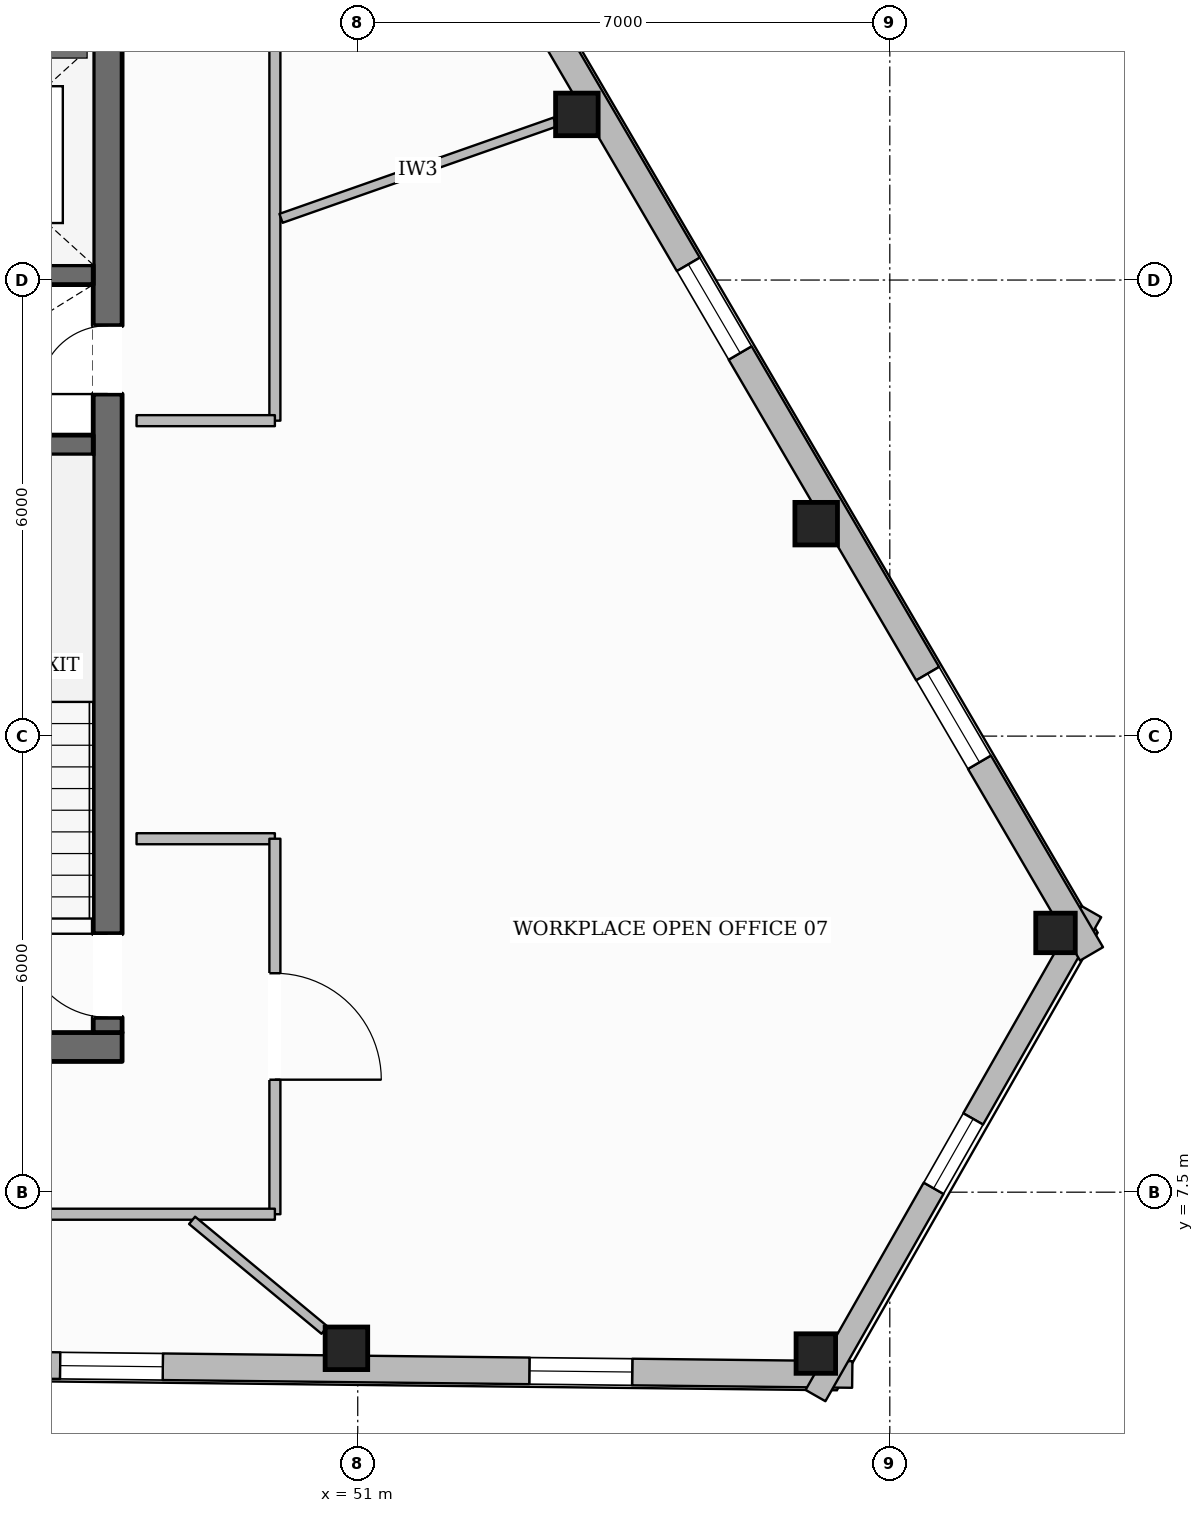
"""IFC4 building model, lengths in metres.
Left out: names, types, materials, properties, quantities, classifications, styles, units other than length and angle.
Written with IfcOpenShell. Run it as: python <this file> out.ifc"""

import sys

from ifc_helpers import new_model, si_unit, direction, frame, frame_2d, origin, origin_2d, place, context, subcontext, project, spatial, rectangle, hollow_rectangle, extrude, element, fill, save


model = new_model("IFC4")
c1 = context("Model", 3, precision=1e-05, world=origin(), true_north=direction((0.0, 1.0)))
c2 = subcontext(c1, "Body", "Model", "MODEL_VIEW")
j1 = project(units=[si_unit("LENGTHUNIT", "METRE"), si_unit("PLANEANGLEUNIT", "RADIAN")], contexts=[c1])
p1 = place(None, origin())
s1 = spatial("IfcSite", under=j1, at=p1, CompositionType="ELEMENT")
p2 = place(p1, origin())
s2 = spatial("IfcBuilding", under=s1, at=p2, CompositionType="ELEMENT")
p3 = place(p2, frame((0.0, 0.0, 254.9)))
s3 = spatial("IfcBuildingStorey", under=s2, at=p3, CompositionType="ELEMENT", Elevation=254.9)
p4 = place(p3, frame((28.1, 9.41, 0.0), z_axis=(0.0, 0.0, 1.0), x_axis=(1.0, 0.0, 0.0)))
e1 = element("IfcWall", 1, at=p4, inside=s3, PredefinedType="SOLIDWALL", context=c2, shape_type="SweptSolid", body=[
    extrude(rectangle(XDim=19.8, YDim=0.38, at=frame_2d((9.9, 0.0))), origin(), (0.0, 0.0, 1.0), 3.61),
])
p5 = place(p4, frame((10.4, 0.0, 0.0)))
e2 = element("IfcOpeningElement", 2, at=p5, cuts=e1, PredefinedType="OPENING", context=c2, shape_type="SweptSolid", body=[
    extrude(rectangle(XDim=1.4, YDim=2.2, at=frame_2d((0.7, 1.1))), frame((0.0, 0.2, 0.0), z_axis=(0.0, -1.0, 0.0), x_axis=(1.0, 0.0, 0.0)), (0.0, 0.0, 1.0), 0.4),
])
p6 = place(p3, frame((47.71, 9.6, 0.0), z_axis=(0.0, 0.0, 1.0), x_axis=(0.0, 1.0, 0.0)))
e3 = element("IfcWall", 3, at=p6, inside=s3, PredefinedType="SOLIDWALL", context=c2, shape_type="SweptSolid", body=[
    extrude(rectangle(XDim=13.0, YDim=0.38, at=frame_2d((6.5, 0.0))), origin(), (0.0, 0.0, 1.0), 3.61),
])
p7 = place(p6, frame((0.2, 0.0, 0.0)))
e4 = element("IfcOpeningElement", 4, at=p7, cuts=e3, PredefinedType="OPENING", context=c2, shape_type="SweptSolid", body=[
    extrude(rectangle(XDim=1.1, YDim=2.15, at=frame_2d((0.55, 1.075))), frame((0.0, 0.2, 0.0), z_axis=(0.0, -1.0, 0.0), x_axis=(1.0, 0.0, 0.0)), (0.0, 0.0, 1.0), 0.4),
])
p8 = place(p6, frame((8.4, 0.0, 0.0)))
e5 = element("IfcOpeningElement", 5, at=p8, cuts=e3, PredefinedType="OPENING", context=c2, shape_type="SweptSolid", body=[
    extrude(rectangle(XDim=0.9, YDim=2.1, at=frame_2d((0.45, 1.05))), frame((0.0, 0.2, 0.0), z_axis=(0.0, -1.0, 0.0), x_axis=(1.0, 0.0, 0.0)), (0.0, 0.0, 1.0), 0.4),
])
for number, where, z_axis, x_axis in (
    (6, (44.32, 17.33, 0.0), (0.0, 0.0, 1.0), (1.0, 0.0, 0.0)),
    (7, (44.32, 19.57, 0.0), (0.0, 0.0, 1.0), (1.0, 0.0, 0.0)),
):
    element("IfcWall", number, at=place(p3, frame(where, z_axis=z_axis, x_axis=x_axis)), inside=s3, PredefinedType="SHEAR", context=c2, shape_type="SweptSolid", body=[
        extrude(rectangle(XDim=3.2, YDim=0.26, at=frame_2d((1.6, 0.0))), origin(), (0.0, 0.0, 1.0), 3.61),
    ])
p9 = place(p3, frame((50.851, 5.446, 0.0), z_axis=(0.0, 0.0, 1.0), x_axis=(1.0, 0.0, 0.0)))
e8 = element("IfcColumn", 8, at=p9, inside=s3, PredefinedType="COLUMN", context=c2, shape_type="SweptSolid", body=[
    extrude(hollow_rectangle(XDim=0.56, YDim=0.56, WallThickness=0.025, at=origin_2d()), origin(), (0.0, 0.0, 1.0), 3.61),
])
for number, where, z_axis, x_axis in (
    (9, (57.027, 5.377, 0.0), (0.0, 0.0, 1.0), (1.0, 0.0, 0.0)),
    (10, (60.18, 10.911, 0.0), (0.0, 0.0, 1.0), (1.0, 0.0, 0.0)),
):
    element("IfcColumn", number, at=place(p3, frame(where, z_axis=z_axis, x_axis=x_axis)), inside=s3, PredefinedType="COLUMN", context=c2, shape_type="SweptSolid", body=[
        extrude(hollow_rectangle(XDim=0.52, YDim=0.52, WallThickness=0.024, at=origin_2d()), origin(), (0.0, 0.0, 1.0), 3.61),
    ])
for number, where, z_axis, x_axis in (
    (11, (57.031, 16.295, 0.0), (0.0, 0.0, 1.0), (1.0, 0.0, 0.0)),
    (12, (53.883, 21.679, 0.0), (0.0, 0.0, 1.0), (1.0, 0.0, 0.0)),
):
    element("IfcColumn", number, at=place(p3, frame(where, z_axis=z_axis, x_axis=x_axis)), inside=s3, PredefinedType="COLUMN", context=c2, shape_type="SweptSolid", body=[
        extrude(hollow_rectangle(XDim=0.56, YDim=0.56, WallThickness=0.025, at=origin_2d()), origin(), (0.0, 0.0, 1.0), 3.61),
    ])
p10 = place(p3, frame((57.506, 5.102, 0.0), z_axis=(0.0, 0.0, 1.0), x_axis=(-0.999937327785, 0.011195557226, 0.0)))
e13 = element("IfcWall", 13, at=p10, inside=s3, PredefinedType="STANDARD", context=c2, shape_type="SweptSolid", body=[
    extrude(rectangle(XDim=38.01, YDim=0.35, at=frame_2d((19.005, 0.0))), origin(), (0.0, 0.0, 1.0), 3.196),
])
p11 = place(p10, frame((33.775, 0.0, 0.65)))
e14 = element("IfcOpeningElement", 14, at=p11, cuts=e13, PredefinedType="OPENING", context=c2, shape_type="SweptSolid", body=[
    extrude(rectangle(XDim=1.35, YDim=1.75, at=frame_2d((0.675, 0.875))), frame((0.0, 0.185, 0.0), z_axis=(0.0, -1.0, 0.0), x_axis=(1.0, 0.0, 0.0)), (0.0, 0.0, 1.0), 0.37),
])
p12 = place(p10, frame((27.599, 0.0, 0.65)))
e15 = element("IfcOpeningElement", 15, at=p12, cuts=e13, PredefinedType="OPENING", context=c2, shape_type="SweptSolid", body=[
    extrude(rectangle(XDim=1.35, YDim=1.75, at=frame_2d((0.675, 0.875))), frame((0.0, 0.185, 0.0), z_axis=(0.0, -1.0, 0.0), x_axis=(1.0, 0.0, 0.0)), (0.0, 0.0, 1.0), 0.37),
])
p13 = place(p10, frame((15.247, 0.0, 0.65)))
e16 = element("IfcOpeningElement", 16, at=p13, cuts=e13, PredefinedType="OPENING", context=c2, shape_type="SweptSolid", body=[
    extrude(rectangle(XDim=1.35, YDim=1.75, at=frame_2d((0.675, 0.875))), frame((0.0, 0.185, 0.0), z_axis=(0.0, -1.0, 0.0), x_axis=(1.0, 0.0, 0.0)), (0.0, 0.0, 1.0), 0.37),
])
p14 = place(p10, frame((9.071, 0.0, 0.65)))
e17 = element("IfcOpeningElement", 17, at=p14, cuts=e13, PredefinedType="OPENING", context=c2, shape_type="SweptSolid", body=[
    extrude(rectangle(XDim=1.35, YDim=1.75, at=frame_2d((0.675, 0.875))), frame((0.0, 0.185, 0.0), z_axis=(0.0, -1.0, 0.0), x_axis=(1.0, 0.0, 0.0)), (0.0, 0.0, 1.0), 0.37),
])
p15 = place(p10, frame((2.896, 0.0, 0.65)))
e18 = element("IfcOpeningElement", 18, at=p15, cuts=e13, PredefinedType="OPENING", context=c2, shape_type="SweptSolid", body=[
    extrude(rectangle(XDim=1.35, YDim=1.75, at=frame_2d((0.675, 0.875))), frame((0.0, 0.185, 0.0), z_axis=(0.0, -1.0, 0.0), x_axis=(1.0, 0.0, 0.0)), (0.0, 0.0, 1.0), 0.37),
])
p16 = place(p3, frame((60.651, 11.191, 0.0), z_axis=(0.0, 0.0, 1.0), x_axis=(-0.495112521008, -0.868828862056, 0.0)))
e19 = element("IfcWall", 19, at=p16, inside=s3, PredefinedType="STANDARD", context=c2, shape_type="SweptSolid", body=[
    extrude(rectangle(XDim=7.328, YDim=0.3, at=frame_2d((3.664, 0.0))), origin(), (0.0, 0.0, 1.0), 3.196),
])
p17 = place(p16, frame((3.139, 0.0, 0.65)))
e20 = element("IfcOpeningElement", 20, at=p17, cuts=e19, PredefinedType="OPENING", context=c2, shape_type="SweptSolid", body=[
    extrude(rectangle(XDim=1.05, YDim=1.7, at=frame_2d((0.525, 0.85))), frame((0.0, 0.16, 0.0), z_axis=(0.0, -1.0, 0.0), x_axis=(1.0, 0.0, 0.0)), (0.0, 0.0, 1.0), 0.32),
])
p18 = place(p3, frame((41.284, 43.76, 0.0), z_axis=(0.0, 0.0, 1.0), x_axis=(0.50479404613, -0.863239810824, 0.0)))
e21 = element("IfcWall", 21, at=p18, inside=s3, PredefinedType="STANDARD", context=c2, shape_type="SweptSolid", body=[
    extrude(rectangle(XDim=38.372, YDim=0.35, at=frame_2d((19.186, 0.0))), origin(), (0.0, 0.0, 1.0), 3.196),
])
p19 = place(p18, frame((34.102, 0.0, 0.65)))
e22 = element("IfcOpeningElement", 22, at=p19, cuts=e21, PredefinedType="OPENING", context=c2, shape_type="SweptSolid", body=[
    extrude(rectangle(XDim=1.35, YDim=1.75, at=frame_2d((0.675, 0.875))), frame((0.0, 0.185, 0.0), z_axis=(0.0, -1.0, 0.0), x_axis=(1.0, 0.0, 0.0)), (0.0, 0.0, 1.0), 0.37),
])
p20 = place(p18, frame((27.864, 0.0, 0.65)))
e23 = element("IfcOpeningElement", 23, at=p20, cuts=e21, PredefinedType="OPENING", context=c2, shape_type="SweptSolid", body=[
    extrude(rectangle(XDim=1.35, YDim=1.75, at=frame_2d((0.675, 0.875))), frame((0.0, 0.185, 0.0), z_axis=(0.0, -1.0, 0.0), x_axis=(1.0, 0.0, 0.0)), (0.0, 0.0, 1.0), 0.37),
])
p21 = place(p18, frame((15.39, 0.0, 0.65)))
e24 = element("IfcOpeningElement", 24, at=p21, cuts=e21, PredefinedType="OPENING", context=c2, shape_type="SweptSolid", body=[
    extrude(rectangle(XDim=1.35, YDim=1.75, at=frame_2d((0.675, 0.875))), frame((0.0, 0.185, 0.0), z_axis=(0.0, -1.0, 0.0), x_axis=(1.0, 0.0, 0.0)), (0.0, 0.0, 1.0), 0.37),
])
p22 = place(p18, frame((9.153, 0.0, 0.65)))
e25 = element("IfcOpeningElement", 25, at=p22, cuts=e21, PredefinedType="OPENING", context=c2, shape_type="SweptSolid", body=[
    extrude(rectangle(XDim=1.35, YDim=1.75, at=frame_2d((0.675, 0.875))), frame((0.0, 0.185, 0.0), z_axis=(0.0, -1.0, 0.0), x_axis=(1.0, 0.0, 0.0)), (0.0, 0.0, 1.0), 0.37),
])
p23 = place(p18, frame((2.915, 0.0, 0.65)))
e26 = element("IfcOpeningElement", 26, at=p23, cuts=e21, PredefinedType="OPENING", context=c2, shape_type="SweptSolid", body=[
    extrude(rectangle(XDim=1.35, YDim=1.75, at=frame_2d((0.675, 0.875))), frame((0.0, 0.185, 0.0), z_axis=(0.0, -1.0, 0.0), x_axis=(1.0, 0.0, 0.0)), (0.0, 0.0, 1.0), 0.37),
])
p24 = place(p3, frame((49.91, 24.99, 0.0), z_axis=(0.0, 0.0, 1.0), x_axis=(0.0, -1.0, 0.0)))
e27 = element("IfcWall", 27, at=p24, inside=s3, PredefinedType="PARTITIONING", context=c2, shape_type="SweptSolid", body=[
    extrude(rectangle(XDim=7.34, YDim=0.145, at=frame_2d((3.67, 0.0))), origin(), (0.0, 0.0, 1.0), 3.349),
])
for number, where, z_axis, x_axis in (
    (28, (49.91, 17.65, 0.0), (0.0, 0.0, 1.0), (-1.0, 0.0, 0.0)),
    (29, (48.09, 12.15, 0.0), (0.0, 0.0, 1.0), (1.0, 0.0, 0.0)),
):
    element("IfcWall", number, at=place(p3, frame(where, z_axis=z_axis, x_axis=x_axis)), inside=s3, PredefinedType="PARTITIONING", context=c2, shape_type="SweptSolid", body=[
        extrude(rectangle(XDim=1.82, YDim=0.145, at=frame_2d((0.91, 0.0))), origin(), (0.0, 0.0, 1.0), 3.61),
    ])
p25 = place(p3, frame((49.91, 12.15, 0.0), z_axis=(0.0, 0.0, 1.0), x_axis=(0.0, -1.0, 0.0)))
e30 = element("IfcWall", 30, at=p25, inside=s3, PredefinedType="PARTITIONING", context=c2, shape_type="SweptSolid", body=[
    extrude(rectangle(XDim=4.94, YDim=0.145, at=frame_2d((2.47, 0.0))), origin(), (0.0, 0.0, 1.0), 3.61),
])
p26 = place(p25, frame((1.77, 0.0, 0.0)))
e31 = element("IfcOpeningElement", 31, at=p26, cuts=e30, PredefinedType="OPENING", context=c2, shape_type="SweptSolid", body=[
    extrude(rectangle(XDim=1.4, YDim=2.2, at=frame_2d((0.7, 1.1))), frame((0.0, 0.083, 0.0), z_axis=(0.0, -1.0, 0.0), x_axis=(1.0, 0.0, 0.0)), (0.0, 0.0, 1.0), 0.165),
])
p27 = place(p3, frame((49.91, 7.21, 0.0), z_axis=(0.0, 0.0, 1.0), x_axis=(-1.0, 0.0, 0.0)))
e32 = element("IfcWall", 32, at=p27, inside=s3, PredefinedType="PARTITIONING", context=c2, shape_type="SweptSolid", body=[
    extrude(rectangle(XDim=23.82, YDim=0.145, at=frame_2d((11.91, 0.0))), origin(), (0.0, 0.0, 1.0), 3.61),
])
p28 = place(p27, frame((19.928, 0.0, 0.0)))
e33 = element("IfcOpeningElement", 33, at=p28, cuts=e32, PredefinedType="OPENING", context=c2, shape_type="SweptSolid", body=[
    extrude(rectangle(XDim=0.98, YDim=2.15, at=frame_2d((0.49, 1.075))), frame((0.0, 0.083, 0.0), z_axis=(0.0, -1.0, 0.0), x_axis=(1.0, 0.0, 0.0)), (0.0, 0.0, 1.0), 0.165),
])
p29 = place(p27, frame((8.487, 0.0, 0.0)))
e34 = element("IfcOpeningElement", 34, at=p29, cuts=e32, PredefinedType="OPENING", context=c2, shape_type="SweptSolid", body=[
    extrude(rectangle(XDim=0.98, YDim=2.15, at=frame_2d((0.49, 1.075))), frame((0.0, 0.083, 0.0), z_axis=(0.0, -1.0, 0.0), x_axis=(1.0, 0.0, 0.0)), (0.0, 0.0, 1.0), 0.165),
])
p30 = place(p3, frame((49.99, 20.312, 0.0), z_axis=(0.0, 0.0, 1.0), x_axis=(0.943507124712, 0.331352237986, 0.0)))
e35 = element("IfcWall", 35, at=p30, inside=s3, PredefinedType="PARTITIONING", context=c2, shape_type="SweptSolid", body=[
    extrude(rectangle(XDim=3.82, YDim=0.125, at=frame_2d((1.91, 0.0))), origin(), (0.0, 0.0, 1.0), 3.61),
])
p31 = place(p3, frame((48.821, 7.129, 0.0), z_axis=(0.0, 0.0, 1.0), x_axis=(0.769836810093, -0.63824077418, 0.0)))
e36 = element("IfcWall", 36, at=p31, inside=s3, PredefinedType="PARTITIONING", context=c2, shape_type="SweptSolid", body=[
    extrude(rectangle(XDim=2.263, YDim=0.125, at=frame_2d((1.132, 0.0))), origin(), (0.0, 0.0, 1.0), 3.246),
])
p32 = place(p14, origin())
e37 = element("IfcWindow", 37, at=p32, inside=s3, PartitioningType="SINGLE_PANEL", PredefinedType="WINDOW", context=c2, shape_type="SweptSolid", body=[
    extrude(rectangle(XDim=1.35, YDim=1.75, at=frame_2d((0.675, 0.875))), frame((0.0, 0.03, 0.0), z_axis=(0.0, -1.0, 0.0), x_axis=(1.0, 0.0, 0.0)), (0.0, 0.0, 1.0), 0.06),
])
fill(e17, e37)
p33 = place(p15, origin())
e38 = element("IfcWindow", 38, at=p33, inside=s3, PartitioningType="SINGLE_PANEL", PredefinedType="WINDOW", context=c2, shape_type="SweptSolid", body=[
    extrude(rectangle(XDim=1.35, YDim=1.75, at=frame_2d((0.675, 0.875))), frame((0.0, 0.03, 0.0), z_axis=(0.0, -1.0, 0.0), x_axis=(1.0, 0.0, 0.0)), (0.0, 0.0, 1.0), 0.06),
])
fill(e18, e38)
p34 = place(p19, origin())
e39 = element("IfcWindow", 39, at=p34, inside=s3, PartitioningType="SINGLE_PANEL", PredefinedType="WINDOW", context=c2, shape_type="SweptSolid", body=[
    extrude(rectangle(XDim=1.35, YDim=1.75, at=frame_2d((0.675, 0.875))), frame((0.0, 0.03, 0.0), z_axis=(0.0, -1.0, 0.0), x_axis=(1.0, 0.0, 0.0)), (0.0, 0.0, 1.0), 0.06),
])
fill(e22, e39)
p35 = place(p20, origin())
e40 = element("IfcWindow", 40, at=p35, inside=s3, PartitioningType="SINGLE_PANEL", PredefinedType="WINDOW", context=c2, shape_type="SweptSolid", body=[
    extrude(rectangle(XDim=1.35, YDim=1.75, at=frame_2d((0.675, 0.875))), frame((0.0, 0.03, 0.0), z_axis=(0.0, -1.0, 0.0), x_axis=(1.0, 0.0, 0.0)), (0.0, 0.0, 1.0), 0.06),
])
fill(e23, e40)
p36 = place(p17, origin())
e41 = element("IfcWindow", 41, at=p36, inside=s3, PartitioningType="SINGLE_PANEL", PredefinedType="WINDOW", context=c2, shape_type="SweptSolid", body=[
    extrude(rectangle(XDim=1.05, YDim=1.7, at=frame_2d((0.525, 0.85))), frame((0.0, 0.03, 0.0), z_axis=(0.0, -1.0, 0.0), x_axis=(1.0, 0.0, 0.0)), (0.0, 0.0, 1.0), 0.06),
])
fill(e20, e41)
p37 = place(p7, origin())
e42 = element("IfcDoor", 42, at=p37, inside=s3, OperationType="SINGLE_SWING_RIGHT", PredefinedType="DOOR", context=c2, shape_type="SweptSolid", body=[
    extrude(rectangle(XDim=1.1, YDim=2.15, at=frame_2d((0.55, 1.075))), frame((0.0, 0.025, 0.0), z_axis=(0.0, -1.0, 0.0), x_axis=(1.0, 0.0, 0.0)), (0.0, 0.0, 1.0), 0.05),
])
fill(e4, e42)
p38 = place(p8, origin())
e43 = element("IfcDoor", 43, at=p38, inside=s3, OperationType="SINGLE_SWING_LEFT", PredefinedType="DOOR", context=c2, shape_type="SweptSolid", body=[
    extrude(rectangle(XDim=0.9, YDim=2.1, at=frame_2d((0.45, 1.05))), frame((0.0, 0.025, 0.0), z_axis=(0.0, -1.0, 0.0), x_axis=(1.0, 0.0, 0.0)), (0.0, 0.0, 1.0), 0.05),
])
fill(e5, e43)
p39 = place(p26, origin())
e44 = element("IfcDoor", 44, at=p39, inside=s3, OperationType="SINGLE_SWING_RIGHT", PredefinedType="DOOR", context=c2, shape_type="SweptSolid", body=[
    extrude(rectangle(XDim=1.4, YDim=2.2, at=frame_2d((0.7, 1.1))), frame((0.0, 0.025, 0.0), z_axis=(0.0, -1.0, 0.0), x_axis=(1.0, 0.0, 0.0)), (0.0, 0.0, 1.0), 0.05),
])
fill(e31, e44)
save(model, sys.argv[1])
